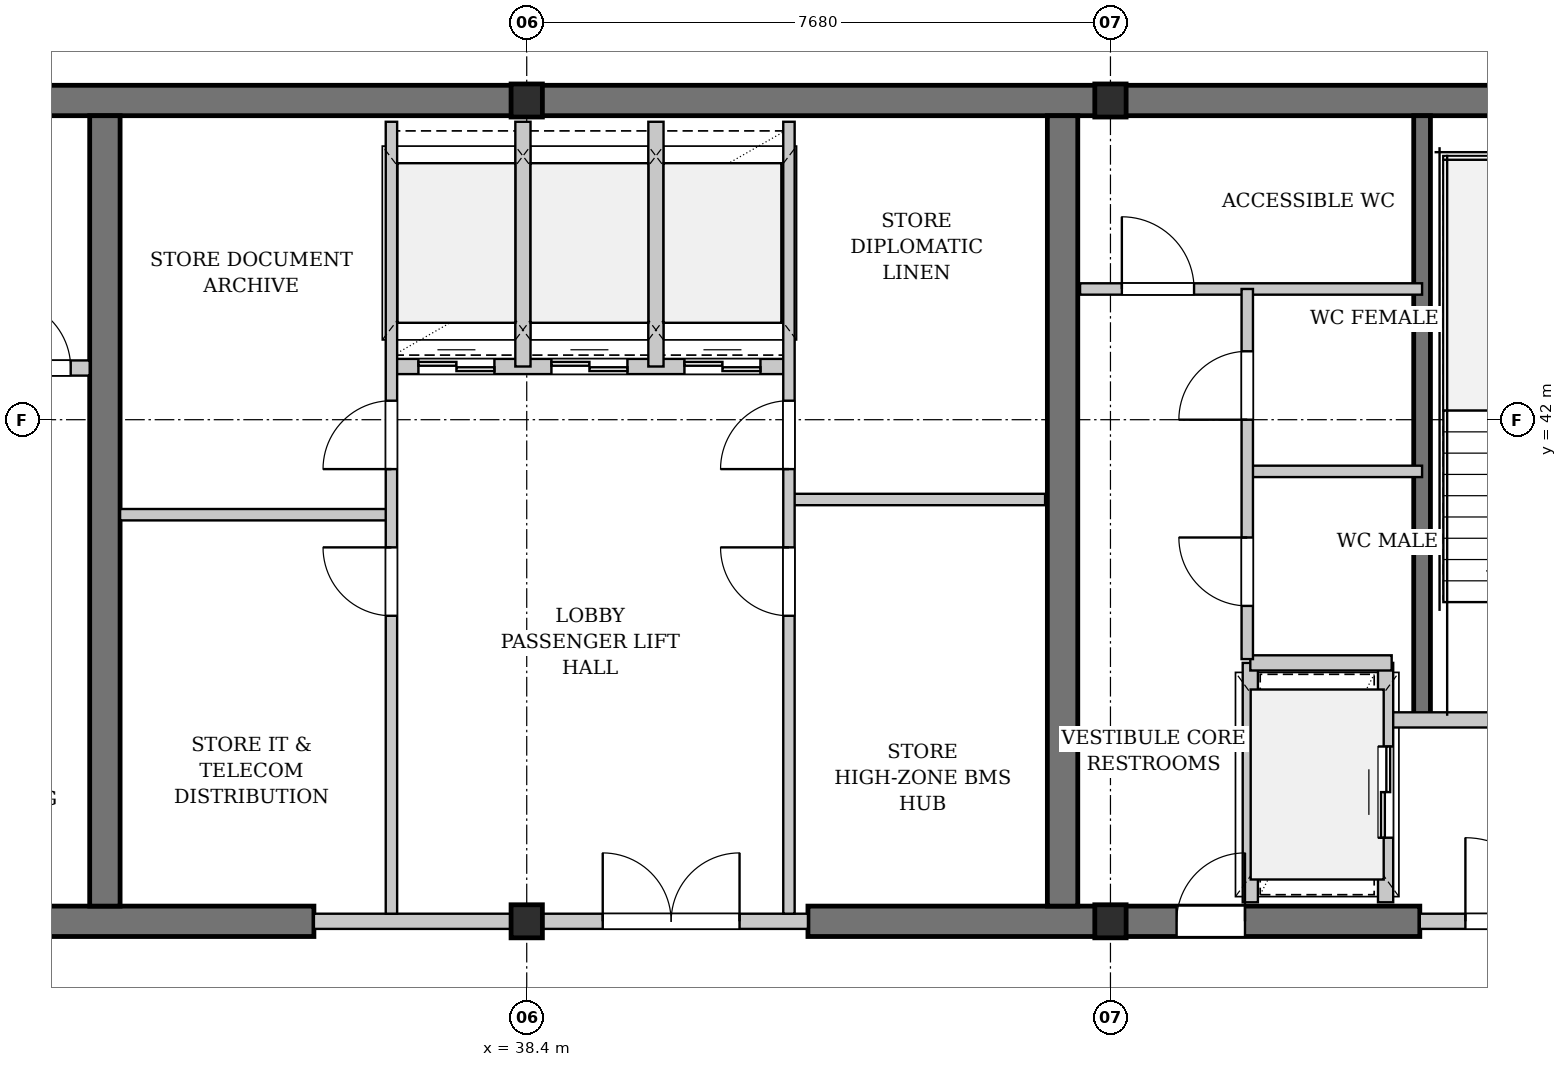
"""IFC4 building model, lengths in metres.
Left out: names, types, materials, properties, quantities, classifications, styles, units other than length and angle.
Written with IfcOpenShell. Run it as: python <this file> out.ifc"""

import sys

from ifc_helpers import new_model, si_unit, direction, frame, frame_2d, origin, origin_2d, place, context, subcontext, project, spatial, rectangle, i_section, extrude, element, fill, save


model = new_model("IFC4")
c1 = context("Model", 3, precision=1e-05, world=origin(), true_north=direction((0.0, 1.0)))
c2 = subcontext(c1, "Body", "Model", "MODEL_VIEW")
j1 = project(units=[si_unit("LENGTHUNIT", "METRE"), si_unit("PLANEANGLEUNIT", "RADIAN")], contexts=[c1])
p1 = place(None, origin())
s1 = spatial("IfcSite", under=j1, at=p1, CompositionType="ELEMENT")
p2 = place(p1, origin())
s2 = spatial("IfcBuilding", under=s1, at=p2, CompositionType="ELEMENT")
p3 = place(p2, frame((0.0, 0.0, 211.1)))
s3 = spatial("IfcBuildingStorey", under=s2, at=p3, CompositionType="ELEMENT", Elevation=211.1)
p4 = place(p3, frame((22.84, 46.2, 0.0), z_axis=(0.0, 0.0, 1.0), x_axis=(1.0, 0.0, 0.0)))
e1 = element("IfcWall", 1, at=p4, inside=s3, PredefinedType="SHEAR", context=c2, shape_type="SweptSolid", body=[
    extrude(rectangle(XDim=31.12, YDim=0.4, at=frame_2d((15.56, 0.0))), origin(), (0.0, 0.0, 1.0), 3.08),
])
p5 = place(p3, frame((30.72, 35.4, 0.0), z_axis=(0.0, 0.0, 1.0), x_axis=(1.0, 0.0, 0.0)))
e2 = element("IfcWall", 2, at=p5, inside=s3, PredefinedType="SHEAR", context=c2, shape_type="SweptSolid", body=[
    extrude(rectangle(XDim=4.88, YDim=0.4, at=frame_2d((2.44, 0.0))), origin(), (0.0, 0.0, 1.0), 3.08),
])
p6 = place(p3, frame((42.1, 35.4, 0.0), z_axis=(0.0, 0.0, 1.0), x_axis=(1.0, 0.0, 0.0)))
e3 = element("IfcWall", 3, at=p6, inside=s3, PredefinedType="SHEAR", context=c2, shape_type="SweptSolid", body=[
    extrude(rectangle(XDim=8.05, YDim=0.4, at=frame_2d((4.025, 0.0))), origin(), (0.0, 0.0, 1.0), 3.08),
])
p7 = place(p6, frame((4.85, 0.0, 0.0)))
e4 = element("IfcOpeningElement", 4, at=p7, cuts=e3, PredefinedType="OPENING", context=c2, shape_type="SweptSolid", body=[
    extrude(rectangle(XDim=0.9, YDim=2.15, at=frame_2d((0.45, 1.075))), frame((0.0, 0.21, 0.0), z_axis=(0.0, -1.0, 0.0), x_axis=(1.0, 0.0, 0.0)), (0.0, 0.0, 1.0), 0.42),
])
for number, where, z_axis, x_axis in (
    (5, (32.85, 35.6, 0.0), (0.0, 0.0, 1.0), (0.0, 1.0, 0.0)),
    (6, (45.45, 35.6, 0.0), (0.0, 0.0, 1.0), (0.0, 1.0, 0.0)),
):
    element("IfcWall", number, at=place(p3, frame(where, z_axis=z_axis, x_axis=x_axis)), inside=s3, PredefinedType="SHEAR", context=c2, shape_type="SweptSolid", body=[
        extrude(rectangle(XDim=10.4, YDim=0.4, at=frame_2d((5.2, 0.0))), origin(), (0.0, 0.0, 1.0), 3.08),
    ])
p8 = place(p3, frame((50.18, 38.05, 0.0), z_axis=(0.0, 0.0, 1.0), x_axis=(0.0, 1.0, 0.0)))
e7 = element("IfcWall", 7, at=p8, inside=s3, PredefinedType="SHEAR", context=c2, shape_type="SweptSolid", body=[
    extrude(rectangle(XDim=7.95, YDim=0.22, at=frame_2d((3.975, 0.0))), origin(), (0.0, 0.0, 1.0), 3.08),
])
for number, where, z_axis, x_axis in (
    (8, (38.4, 35.4, 0.0), (0.0, 0.0, 1.0), (1.0, 0.0, 0.0)),
    (9, (38.4, 46.2, 0.0), (0.0, 0.0, 1.0), (1.0, 0.0, 0.0)),
    (10, (46.08, 35.4, 0.0), (0.0, 0.0, 1.0), (1.0, 0.0, 0.0)),
    (11, (46.08, 46.2, 0.0), (0.0, 0.0, 1.0), (1.0, 0.0, 0.0)),
):
    element("IfcColumn", number, at=place(p3, frame(where, z_axis=z_axis, x_axis=x_axis)), inside=s3, PredefinedType="COLUMN", context=c2, shape_type="SweptSolid", body=[
        extrude(i_section(OverallWidth=0.412, OverallDepth=0.435, WebThickness=0.036, FlangeThickness=0.058, FilletRadius=0.015, at=origin_2d()), origin(), (0.0, 0.0, 1.0), 3.3),
    ])
p9 = place(p3, frame((27.32, 42.68, 0.0), z_axis=(0.0, 0.0, 1.0), x_axis=(1.0, 0.0, 0.0)))
e12 = element("IfcWall", 12, at=p9, inside=s3, PredefinedType="PARTITIONING", context=c2, shape_type="SweptSolid", body=[
    extrude(rectangle(XDim=5.33, YDim=0.2, at=frame_2d((2.665, 0.0))), origin(), (0.0, 0.0, 1.0), 3.08),
])
p10 = place(p9, frame((4.18, 0.0, 0.0)))
e13 = element("IfcOpeningElement", 13, at=p10, cuts=e12, PredefinedType="OPENING", context=c2, shape_type="SweptSolid", body=[
    extrude(rectangle(XDim=0.9, YDim=2.15, at=frame_2d((0.45, 1.075))), frame((0.0, 0.11, 0.0), z_axis=(0.0, -1.0, 0.0), x_axis=(1.0, 0.0, 0.0)), (0.0, 0.0, 1.0), 0.22),
])
p11 = place(p3, frame((35.6, 35.4, 0.0), z_axis=(0.0, 0.0, 1.0), x_axis=(1.0, 0.0, 0.0)))
e14 = element("IfcWall", 14, at=p11, inside=s3, PredefinedType="PARTITIONING", context=c2, shape_type="SweptSolid", body=[
    extrude(rectangle(XDim=6.5, YDim=0.2, at=frame_2d((3.25, 0.0))), origin(), (0.0, 0.0, 1.0), 2.313),
])
p12 = place(p11, frame((3.8, 0.0, 0.0)))
e15 = element("IfcOpeningElement", 15, at=p12, cuts=e14, PredefinedType="OPENING", context=c2, shape_type="SweptSolid", body=[
    extrude(rectangle(XDim=1.8, YDim=2.3, at=frame_2d((0.9, 1.15))), frame((0.0, 0.11, 0.0), z_axis=(0.0, -1.0, 0.0), x_axis=(1.0, 0.0, 0.0)), (0.0, 0.0, 1.0), 0.22),
])
p13 = place(p3, frame((36.6, 42.7, 0.0), z_axis=(0.0, 0.0, 1.0), x_axis=(1.0, 0.0, 0.0)))
e16 = element("IfcWall", 16, at=p13, inside=s3, PredefinedType="PARTITIONING", context=c2, shape_type="SweptSolid", body=[
    extrude(rectangle(XDim=5.25, YDim=0.2, at=frame_2d((2.625, 0.0))), origin(), (0.0, 0.0, 1.0), 3.08),
])
p14 = place(p13, frame((0.375, 0.0, 0.0)))
e17 = element("IfcOpeningElement", 17, at=p14, cuts=e16, PredefinedType="OPENING", context=c2, shape_type="SweptSolid", body=[
    extrude(rectangle(XDim=1.0, YDim=2.2, at=frame_2d((0.5, 1.1))), frame((0.0, 0.11, 0.0), z_axis=(0.0, -1.0, 0.0), x_axis=(1.0, 0.0, 0.0)), (0.0, 0.0, 1.0), 0.22),
])
p15 = place(p13, frame((2.125, 0.0, 0.0)))
e18 = element("IfcOpeningElement", 18, at=p15, cuts=e16, PredefinedType="OPENING", context=c2, shape_type="SweptSolid", body=[
    extrude(rectangle(XDim=1.0, YDim=2.2, at=frame_2d((0.5, 1.1))), frame((0.0, 0.11, 0.0), z_axis=(0.0, -1.0, 0.0), x_axis=(1.0, 0.0, 0.0)), (0.0, 0.0, 1.0), 0.22),
])
p16 = place(p13, frame((3.875, 0.0, 0.0)))
e19 = element("IfcOpeningElement", 19, at=p16, cuts=e16, PredefinedType="OPENING", context=c2, shape_type="SweptSolid", body=[
    extrude(rectangle(XDim=1.0, YDim=2.2, at=frame_2d((0.5, 1.1))), frame((0.0, 0.11, 0.0), z_axis=(0.0, -1.0, 0.0), x_axis=(1.0, 0.0, 0.0)), (0.0, 0.0, 1.0), 0.22),
])
p17 = place(p3, frame((38.35, 42.7, 0.0), z_axis=(0.0, 0.0, 1.0), x_axis=(0.0, 1.0, 0.0)))
e20 = element("IfcWall", 20, at=p17, inside=s3, PredefinedType="PARTITIONING", context=c2, shape_type="SweptSolid", body=[
    extrude(rectangle(XDim=3.22, YDim=0.2, at=frame_2d((1.61, 0.0))), origin(), (0.0, 0.0, 1.0), 2.313),
])
p18 = place(p3, frame((40.1, 42.7, 0.0), z_axis=(0.0, 0.0, 1.0), x_axis=(0.0, 1.0, 0.0)))
e21 = element("IfcWall", 21, at=p18, inside=s3, PredefinedType="PARTITIONING", context=c2, shape_type="SweptSolid", body=[
    extrude(rectangle(XDim=3.22, YDim=0.2, at=frame_2d((1.61, 0.0))), origin(), (0.0, 0.0, 1.0), 3.08),
])
p19 = place(p3, frame((33.05, 40.75, 0.0), z_axis=(0.0, 0.0, 1.0), x_axis=(1.0, 0.0, 0.0)))
e22 = element("IfcWall", 22, at=p19, inside=s3, PredefinedType="PARTITIONING", context=c2, shape_type="SweptSolid", body=[
    extrude(rectangle(XDim=3.57, YDim=0.15, at=frame_2d((1.785, 0.0))), origin(), (0.0, 0.0, 1.0), 3.08),
])
p20 = place(p3, frame((36.62, 35.5, 0.0), z_axis=(0.0, 0.0, 1.0), x_axis=(0.0, 1.0, 0.0)))
e23 = element("IfcWall", 23, at=p20, inside=s3, PredefinedType="PARTITIONING", context=c2, shape_type="SweptSolid", body=[
    extrude(rectangle(XDim=10.42, YDim=0.15, at=frame_2d((5.21, 0.0))), origin(), (0.0, 0.0, 1.0), 3.08),
])
p21 = place(p20, frame((3.92, 0.0, 0.0)))
e24 = element("IfcOpeningElement", 24, at=p21, cuts=e23, PredefinedType="OPENING", context=c2, shape_type="SweptSolid", body=[
    extrude(rectangle(XDim=0.9, YDim=2.15, at=frame_2d((0.45, 1.075))), frame((0.0, 0.085, 0.0), z_axis=(0.0, -1.0, 0.0), x_axis=(1.0, 0.0, 0.0)), (0.0, 0.0, 1.0), 0.17),
])
p22 = place(p20, frame((5.85, 0.0, 0.0)))
e25 = element("IfcOpeningElement", 25, at=p22, cuts=e23, PredefinedType="OPENING", context=c2, shape_type="SweptSolid", body=[
    extrude(rectangle(XDim=0.9, YDim=2.15, at=frame_2d((0.45, 1.075))), frame((0.0, 0.085, 0.0), z_axis=(0.0, -1.0, 0.0), x_axis=(1.0, 0.0, 0.0)), (0.0, 0.0, 1.0), 0.17),
])
p23 = place(p3, frame((41.85, 40.95, 0.0), z_axis=(0.0, 0.0, 1.0), x_axis=(1.0, 0.0, 0.0)))
e26 = element("IfcWall", 26, at=p23, inside=s3, PredefinedType="PARTITIONING", context=c2, shape_type="SweptSolid", body=[
    extrude(rectangle(XDim=3.37, YDim=0.15, at=frame_2d((1.685, 0.0))), origin(), (0.0, 0.0, 1.0), 3.08),
])
p24 = place(p3, frame((41.85, 35.5, 0.0), z_axis=(0.0, 0.0, 1.0), x_axis=(0.0, 1.0, 0.0)))
e27 = element("IfcWall", 27, at=p24, inside=s3, PredefinedType="PARTITIONING", context=c2, shape_type="SweptSolid", body=[
    extrude(rectangle(XDim=10.42, YDim=0.15, at=frame_2d((5.21, 0.0))), origin(), (0.0, 0.0, 1.0), 3.08),
])
p25 = place(p24, frame((3.92, 0.0, 0.0)))
e28 = element("IfcOpeningElement", 28, at=p25, cuts=e27, PredefinedType="OPENING", context=c2, shape_type="SweptSolid", body=[
    extrude(rectangle(XDim=0.9, YDim=2.15, at=frame_2d((0.45, 1.075))), frame((0.0, 0.085, 0.0), z_axis=(0.0, -1.0, 0.0), x_axis=(1.0, 0.0, 0.0)), (0.0, 0.0, 1.0), 0.17),
])
p26 = place(p24, frame((5.85, 0.0, 0.0)))
e29 = element("IfcOpeningElement", 29, at=p26, cuts=e27, PredefinedType="OPENING", context=c2, shape_type="SweptSolid", body=[
    extrude(rectangle(XDim=0.9, YDim=2.15, at=frame_2d((0.45, 1.075))), frame((0.0, 0.085, 0.0), z_axis=(0.0, -1.0, 0.0), x_axis=(1.0, 0.0, 0.0)), (0.0, 0.0, 1.0), 0.17),
])
p27 = place(p3, frame((49.78, 38.05, 0.0), z_axis=(0.0, 0.0, 1.0), x_axis=(1.0, 0.0, 0.0)))
e30 = element("IfcWall", 30, at=p27, inside=s3, PredefinedType="PARTITIONING", context=c2, shape_type="SweptSolid", body=[
    extrude(rectangle(XDim=3.72, YDim=0.2, at=frame_2d((1.86, 0.0))), origin(), (0.0, 0.0, 1.0), 3.08),
])
p28 = place(p27, frame((1.436, 0.0, 0.0)))
e31 = element("IfcOpeningElement", 31, at=p28, cuts=e30, PredefinedType="OPENING", context=c2, shape_type="SweptSolid", body=[
    extrude(rectangle(XDim=1.1, YDim=2.15, at=frame_2d((0.55, 1.075))), frame((0.0, 0.11, 0.0), z_axis=(0.0, -1.0, 0.0), x_axis=(1.0, 0.0, 0.0)), (0.0, 0.0, 1.0), 0.22),
])
p29 = place(p3, frame((50.15, 35.4, 0.0), z_axis=(0.0, 0.0, 1.0), x_axis=(1.0, 0.0, 0.0)))
e32 = element("IfcWall", 32, at=p29, inside=s3, PredefinedType="PARTITIONING", context=c2, shape_type="SweptSolid", body=[
    extrude(rectangle(XDim=2.3, YDim=0.2, at=frame_2d((1.15, 0.0))), origin(), (0.0, 0.0, 1.0), 2.313),
])
p30 = place(p29, frame((0.6, 0.0, 0.0)))
e33 = element("IfcOpeningElement", 33, at=p30, cuts=e32, PredefinedType="OPENING", context=c2, shape_type="SweptSolid", body=[
    extrude(rectangle(XDim=1.1, YDim=2.15, at=frame_2d((0.55, 1.075))), frame((0.0, 0.11, 0.0), z_axis=(0.0, -1.0, 0.0), x_axis=(1.0, 0.0, 0.0)), (0.0, 0.0, 1.0), 0.22),
])
p31 = place(p3, frame((49.7, 35.65, 0.0), z_axis=(0.0, 0.0, 1.0), x_axis=(0.0, 1.0, 0.0)))
e34 = element("IfcWall", 34, at=p31, inside=s3, PredefinedType="PARTITIONING", context=c2, shape_type="SweptSolid", body=[
    extrude(rectangle(XDim=3.15, YDim=0.2, at=frame_2d((1.575, 0.0))), origin(), (0.0, 0.0, 1.0), 3.08),
])
p32 = place(p31, frame((0.85, 0.0, 0.0)))
e35 = element("IfcOpeningElement", 35, at=p32, cuts=e34, PredefinedType="OPENING", context=c2, shape_type="SweptSolid", body=[
    extrude(rectangle(XDim=1.2, YDim=2.2, at=frame_2d((0.6, 1.1))), frame((0.0, 0.11, 0.0), z_axis=(0.0, -1.0, 0.0), x_axis=(1.0, 0.0, 0.0)), (0.0, 0.0, 1.0), 0.22),
])
p33 = place(p3, frame((47.92, 35.65, 0.0), z_axis=(0.0, 0.0, 1.0), x_axis=(0.0, 1.0, 0.0)))
e36 = element("IfcWall", 36, at=p33, inside=s3, PredefinedType="PARTITIONING", context=c2, shape_type="SweptSolid", body=[
    extrude(rectangle(XDim=3.15, YDim=0.2, at=frame_2d((1.575, 0.0))), origin(), (0.0, 0.0, 1.0), 3.08),
])
p34 = place(p3, frame((47.92, 38.8, 0.0), z_axis=(0.0, 0.0, 1.0), x_axis=(1.0, 0.0, 0.0)))
e37 = element("IfcWall", 37, at=p34, inside=s3, PredefinedType="PARTITIONING", context=c2, shape_type="SweptSolid", body=[
    extrude(rectangle(XDim=1.86, YDim=0.2, at=frame_2d((0.93, 0.0))), origin(), (0.0, 0.0, 1.0), 3.08),
])
p35 = place(p3, frame((45.68, 43.72, 0.0), z_axis=(0.0, 0.0, 1.0), x_axis=(1.0, 0.0, 0.0)))
e38 = element("IfcWall", 38, at=p35, inside=s3, PredefinedType="PARTITIONING", context=c2, shape_type="SweptSolid", body=[
    extrude(rectangle(XDim=4.5, YDim=0.15, at=frame_2d((2.25, 0.0))), origin(), (0.0, 0.0, 1.0), 3.08),
])
p36 = place(p35, frame((0.55, 0.0, 0.0)))
e39 = element("IfcOpeningElement", 39, at=p36, cuts=e38, PredefinedType="OPENING", context=c2, shape_type="SweptSolid", body=[
    extrude(rectangle(XDim=0.95, YDim=2.15, at=frame_2d((0.475, 1.075))), frame((0.0, 0.085, 0.0), z_axis=(0.0, -1.0, 0.0), x_axis=(1.0, 0.0, 0.0)), (0.0, 0.0, 1.0), 0.17),
])
p37 = place(p3, frame((47.88, 41.32, 0.0), z_axis=(0.0, 0.0, 1.0), x_axis=(1.0, 0.0, 0.0)))
e40 = element("IfcWall", 40, at=p37, inside=s3, PredefinedType="PARTITIONING", context=c2, shape_type="SweptSolid", body=[
    extrude(rectangle(XDim=2.3, YDim=0.15, at=frame_2d((1.15, 0.0))), origin(), (0.0, 0.0, 1.0), 3.08),
])
p38 = place(p3, frame((47.88, 38.85, 0.0), z_axis=(0.0, 0.0, 1.0), x_axis=(0.0, 1.0, 0.0)))
e41 = element("IfcWall", 41, at=p38, inside=s3, PredefinedType="PARTITIONING", context=c2, shape_type="SweptSolid", body=[
    extrude(rectangle(XDim=4.87, YDim=0.15, at=frame_2d((2.435, 0.0))), origin(), (0.0, 0.0, 1.0), 3.08),
])
p39 = place(p38, frame((0.7, 0.0, 0.0)))
e42 = element("IfcOpeningElement", 42, at=p39, cuts=e41, PredefinedType="OPENING", context=c2, shape_type="SweptSolid", body=[
    extrude(rectangle(XDim=0.9, YDim=2.15, at=frame_2d((0.45, 1.075))), frame((0.0, 0.085, 0.0), z_axis=(0.0, -1.0, 0.0), x_axis=(1.0, 0.0, 0.0)), (0.0, 0.0, 1.0), 0.17),
])
p40 = place(p38, frame((3.15, 0.0, 0.0)))
e43 = element("IfcOpeningElement", 43, at=p40, cuts=e41, PredefinedType="OPENING", context=c2, shape_type="SweptSolid", body=[
    extrude(rectangle(XDim=0.9, YDim=2.15, at=frame_2d((0.45, 1.075))), frame((0.0, 0.085, 0.0), z_axis=(0.0, -1.0, 0.0), x_axis=(1.0, 0.0, 0.0)), (0.0, 0.0, 1.0), 0.17),
])
p41 = place(p10, origin())
e44 = element("IfcDoor", 44, at=p41, inside=s3, OperationType="SINGLE_SWING_LEFT", PredefinedType="DOOR", context=c2, shape_type="SweptSolid", body=[
    extrude(rectangle(XDim=0.9, YDim=2.15, at=frame_2d((0.45, 1.075))), frame((0.0, 0.025, 0.0), z_axis=(0.0, -1.0, 0.0), x_axis=(1.0, 0.0, 0.0)), (0.0, 0.0, 1.0), 0.05),
])
fill(e13, e44)
p42 = place(p12, origin())
e45 = element("IfcDoor", 45, at=p42, inside=s3, OperationType="DOUBLE_DOOR_SINGLE_SWING", PredefinedType="DOOR", context=c2, shape_type="SweptSolid", body=[
    extrude(rectangle(XDim=1.8, YDim=2.3, at=frame_2d((0.9, 1.15))), frame((0.0, 0.025, 0.0), z_axis=(0.0, -1.0, 0.0), x_axis=(1.0, 0.0, 0.0)), (0.0, 0.0, 1.0), 0.05),
])
fill(e15, e45)
p43 = place(p14, origin())
e46 = element("IfcDoor", 46, at=p43, inside=s3, OperationType="DOUBLE_DOOR_SLIDING", PredefinedType="DOOR", context=c2, shape_type="SweptSolid", body=[
    extrude(rectangle(XDim=1.0, YDim=2.2, at=frame_2d((0.5, 1.1))), frame((0.0, 0.025, 0.0), z_axis=(0.0, -1.0, 0.0), x_axis=(1.0, 0.0, 0.0)), (0.0, 0.0, 1.0), 0.05),
])
fill(e17, e46)
p44 = place(p15, origin())
e47 = element("IfcDoor", 47, at=p44, inside=s3, OperationType="DOUBLE_DOOR_SLIDING", PredefinedType="DOOR", context=c2, shape_type="SweptSolid", body=[
    extrude(rectangle(XDim=1.0, YDim=2.2, at=frame_2d((0.5, 1.1))), frame((0.0, 0.025, 0.0), z_axis=(0.0, -1.0, 0.0), x_axis=(1.0, 0.0, 0.0)), (0.0, 0.0, 1.0), 0.05),
])
fill(e18, e47)
p45 = place(p16, origin())
e48 = element("IfcDoor", 48, at=p45, inside=s3, OperationType="DOUBLE_DOOR_SLIDING", PredefinedType="DOOR", context=c2, shape_type="SweptSolid", body=[
    extrude(rectangle(XDim=1.0, YDim=2.2, at=frame_2d((0.5, 1.1))), frame((0.0, 0.025, 0.0), z_axis=(0.0, -1.0, 0.0), x_axis=(1.0, 0.0, 0.0)), (0.0, 0.0, 1.0), 0.05),
])
fill(e19, e48)
p46 = place(p21, origin())
e49 = element("IfcDoor", 49, at=p46, inside=s3, OperationType="SINGLE_SWING_RIGHT", PredefinedType="DOOR", context=c2, shape_type="SweptSolid", body=[
    extrude(rectangle(XDim=0.9, YDim=2.15, at=frame_2d((0.45, 1.075))), frame((0.0, 0.025, 0.0), z_axis=(0.0, -1.0, 0.0), x_axis=(1.0, 0.0, 0.0)), (0.0, 0.0, 1.0), 0.05),
])
fill(e24, e49)
p47 = place(p22, origin())
e50 = element("IfcDoor", 50, at=p47, inside=s3, OperationType="SINGLE_SWING_LEFT", PredefinedType="DOOR", context=c2, shape_type="SweptSolid", body=[
    extrude(rectangle(XDim=0.9, YDim=2.15, at=frame_2d((0.45, 1.075))), frame((0.0, 0.025, 0.0), z_axis=(0.0, -1.0, 0.0), x_axis=(1.0, 0.0, 0.0)), (0.0, 0.0, 1.0), 0.05),
])
fill(e25, e50)
p48 = place(p25, origin())
e51 = element("IfcDoor", 51, at=p48, inside=s3, OperationType="SINGLE_SWING_RIGHT", PredefinedType="DOOR", context=c2, shape_type="SweptSolid", body=[
    extrude(rectangle(XDim=0.9, YDim=2.15, at=frame_2d((0.45, 1.075))), frame((0.0, 0.025, 0.0), z_axis=(0.0, -1.0, 0.0), x_axis=(1.0, 0.0, 0.0)), (0.0, 0.0, 1.0), 0.05),
])
fill(e28, e51)
p49 = place(p26, origin())
e52 = element("IfcDoor", 52, at=p49, inside=s3, OperationType="SINGLE_SWING_LEFT", PredefinedType="DOOR", context=c2, shape_type="SweptSolid", body=[
    extrude(rectangle(XDim=0.9, YDim=2.15, at=frame_2d((0.45, 1.075))), frame((0.0, 0.025, 0.0), z_axis=(0.0, -1.0, 0.0), x_axis=(1.0, 0.0, 0.0)), (0.0, 0.0, 1.0), 0.05),
])
fill(e29, e52)
p50 = place(p30, origin())
e53 = element("IfcDoor", 53, at=p50, inside=s3, OperationType="SINGLE_SWING_LEFT", PredefinedType="DOOR", context=c2, shape_type="SweptSolid", body=[
    extrude(rectangle(XDim=1.1, YDim=2.15, at=frame_2d((0.55, 1.075))), frame((0.0, 0.025, 0.0), z_axis=(0.0, -1.0, 0.0), x_axis=(1.0, 0.0, 0.0)), (0.0, 0.0, 1.0), 0.05),
])
fill(e33, e53)
p51 = place(p32, origin())
e54 = element("IfcDoor", 54, at=p51, inside=s3, OperationType="DOUBLE_DOOR_SLIDING", PredefinedType="DOOR", context=c2, shape_type="SweptSolid", body=[
    extrude(rectangle(XDim=1.2, YDim=2.2, at=frame_2d((0.6, 1.1))), frame((0.0, 0.025, 0.0), z_axis=(0.0, -1.0, 0.0), x_axis=(1.0, 0.0, 0.0)), (0.0, 0.0, 1.0), 0.05),
])
fill(e35, e54)
p52 = place(p36, origin())
e55 = element("IfcDoor", 55, at=p52, inside=s3, OperationType="SINGLE_SWING_LEFT", PredefinedType="DOOR", context=c2, shape_type="SweptSolid", body=[
    extrude(rectangle(XDim=0.95, YDim=2.15, at=frame_2d((0.475, 1.075))), frame((0.0, 0.025, 0.0), z_axis=(0.0, -1.0, 0.0), x_axis=(1.0, 0.0, 0.0)), (0.0, 0.0, 1.0), 0.05),
])
fill(e39, e55)
p53 = place(p39, origin())
e56 = element("IfcDoor", 56, at=p53, inside=s3, OperationType="SINGLE_SWING_RIGHT", PredefinedType="DOOR", context=c2, shape_type="SweptSolid", body=[
    extrude(rectangle(XDim=0.9, YDim=2.15, at=frame_2d((0.45, 1.075))), frame((0.0, 0.025, 0.0), z_axis=(0.0, -1.0, 0.0), x_axis=(1.0, 0.0, 0.0)), (0.0, 0.0, 1.0), 0.05),
])
fill(e42, e56)
p54 = place(p40, origin())
e57 = element("IfcDoor", 57, at=p54, inside=s3, OperationType="SINGLE_SWING_LEFT", PredefinedType="DOOR", context=c2, shape_type="SweptSolid", body=[
    extrude(rectangle(XDim=0.9, YDim=2.15, at=frame_2d((0.45, 1.075))), frame((0.0, 0.025, 0.0), z_axis=(0.0, -1.0, 0.0), x_axis=(1.0, 0.0, 0.0)), (0.0, 0.0, 1.0), 0.05),
])
fill(e43, e57)
p55 = place(p7, origin())
e58 = element("IfcDoor", 58, at=p55, inside=s3, OperationType="SINGLE_SWING_RIGHT", PredefinedType="DOOR", context=c2, shape_type="SweptSolid", body=[
    extrude(rectangle(XDim=0.9, YDim=2.15, at=frame_2d((0.45, 1.075))), frame((0.0, 0.025, 0.0), z_axis=(0.0, -1.0, 0.0), x_axis=(1.0, 0.0, 0.0)), (0.0, 0.0, 1.0), 0.05),
])
fill(e4, e58)
save(model, sys.argv[1])
